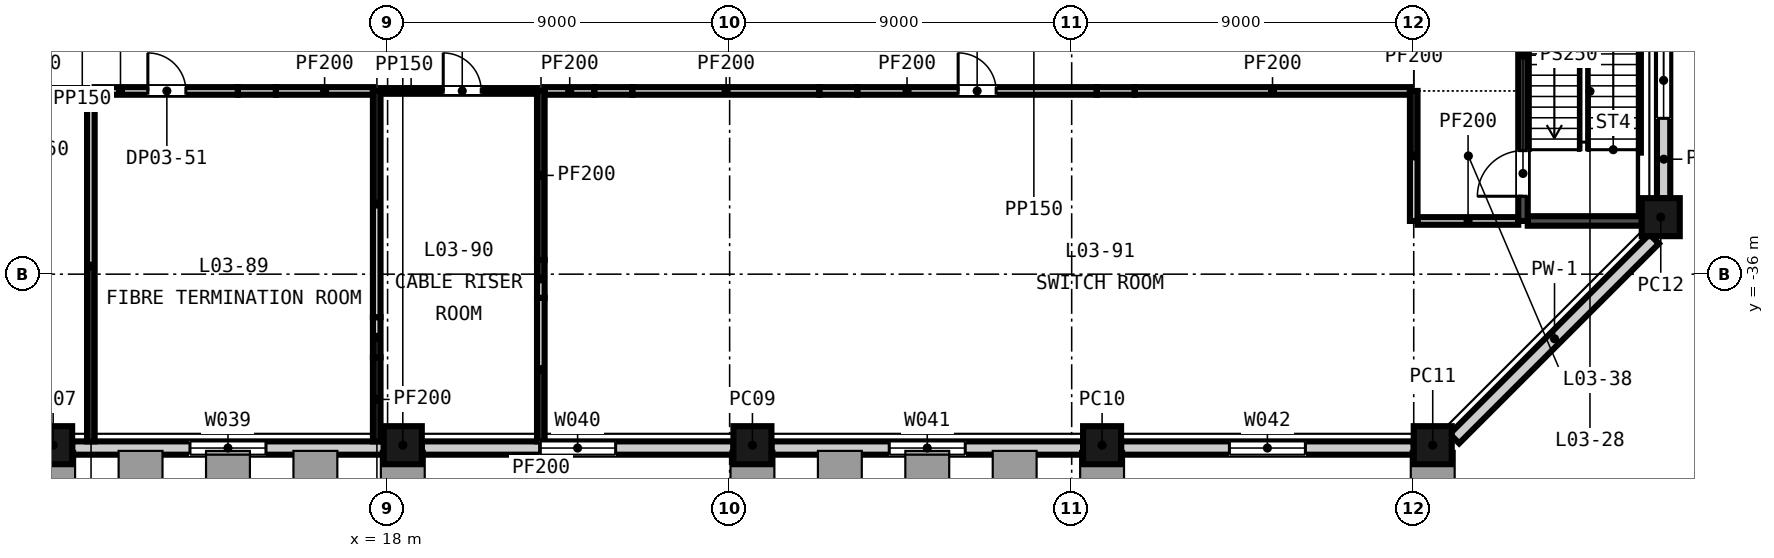
"""IFC4 building model, lengths in metres.
Left out: names, types, materials, properties, quantities, classifications, styles, units other than length and angle.
Written with IfcOpenShell. Run it as: python <this file> out.ifc"""

import sys

from ifc_helpers import new_model, si_unit, direction, frame, frame_2d, origin, origin_2d, place, context, subcontext, project, spatial, rectangle, extrude, element, fill, save


model = new_model("IFC4")
c1 = context("Model", 3, precision=1e-05, world=origin(), true_north=direction((0.0, 1.0)))
c2 = subcontext(c1, "Body", "Model", "MODEL_VIEW")
j1 = project(units=[si_unit("LENGTHUNIT", "METRE"), si_unit("PLANEANGLEUNIT", "RADIAN")], contexts=[c1])
p1 = place(None, origin())
s1 = spatial("IfcSite", under=j1, at=p1, CompositionType="ELEMENT")
p2 = place(p1, origin())
s2 = spatial("IfcBuilding", under=s1, at=p2, CompositionType="ELEMENT")
p3 = place(p2, frame((0.0, 0.0, 22.5)))
s3 = spatial("IfcBuildingStorey", under=s2, at=p3, CompositionType="ELEMENT", Elevation=22.5)
for number, where, z_axis, x_axis in (
    (1, (9.2, -40.5, -0.3), (0.0, 0.0, 1.0), (1.0, 0.0, 0.0)),
    (2, (18.4, -40.5, -0.3), (0.0, 0.0, 1.0), (1.0, 0.0, 0.0)),
    (3, (27.6, -40.5, -0.3), (0.0, 0.0, 1.0), (1.0, 0.0, 0.0)),
    (4, (36.8, -40.5, -0.3), (0.0, 0.0, 1.0), (1.0, 0.0, 0.0)),
    (5, (45.5, -40.5, -0.3), (0.0, 0.0, 1.0), (1.0, 0.0, 0.0)),
    (6, (51.5, -34.5, -0.3), (0.0, 0.0, 1.0), (0.0, 1.0, 0.0)),
):
    element("IfcColumn", number, at=place(p3, frame(where, z_axis=z_axis, x_axis=x_axis)), inside=s3, PredefinedType="COLUMN", context=c2, shape_type="SweptSolid", body=[
        extrude(rectangle(XDim=1.0, YDim=1.0, at=origin_2d()), origin(), (0.0, 0.0, 1.0), 4.5),
    ])
p4 = place(p3, frame((9.7, -40.575, -0.3), z_axis=(0.0, 0.0, 1.0), x_axis=(1.0, 0.0, 0.0)))
e7 = element("IfcWall", 7, at=p4, inside=s3, PredefinedType="SOLIDWALL", context=c2, shape_type="SweptSolid", body=[
    extrude(rectangle(XDim=8.2, YDim=0.35, at=frame_2d((4.1, 0.0))), origin(), (0.0, 0.0, 1.0), 3.6),
])
p5 = place(p4, frame((3.1, 0.0, 1.2)))
e8 = element("IfcOpeningElement", 8, at=p5, cuts=e7, PredefinedType="OPENING", context=c2, shape_type="SweptSolid", body=[
    extrude(rectangle(XDim=2.0, YDim=2.35, at=frame_2d((1.0, 1.175))), frame((0.0, 0.185, 0.0), z_axis=(0.0, -1.0, 0.0), x_axis=(1.0, 0.0, 0.0)), (0.0, 0.0, 1.0), 0.37),
])
p6 = place(p3, frame((18.9, -40.575, -0.3), z_axis=(0.0, 0.0, 1.0), x_axis=(1.0, 0.0, 0.0)))
e9 = element("IfcWall", 9, at=p6, inside=s3, PredefinedType="SOLIDWALL", context=c2, shape_type="SweptSolid", body=[
    extrude(rectangle(XDim=8.2, YDim=0.35, at=frame_2d((4.1, 0.0))), origin(), (0.0, 0.0, 1.0), 3.6),
])
p7 = place(p6, frame((3.1, 0.0, 1.2)))
e10 = element("IfcOpeningElement", 10, at=p7, cuts=e9, PredefinedType="OPENING", context=c2, shape_type="SweptSolid", body=[
    extrude(rectangle(XDim=2.0, YDim=2.35, at=frame_2d((1.0, 1.175))), frame((0.0, 0.185, 0.0), z_axis=(0.0, -1.0, 0.0), x_axis=(1.0, 0.0, 0.0)), (0.0, 0.0, 1.0), 0.37),
])
p8 = place(p3, frame((28.1, -40.575, -0.3), z_axis=(0.0, 0.0, 1.0), x_axis=(1.0, 0.0, 0.0)))
e11 = element("IfcWall", 11, at=p8, inside=s3, PredefinedType="SOLIDWALL", context=c2, shape_type="SweptSolid", body=[
    extrude(rectangle(XDim=8.2, YDim=0.35, at=frame_2d((4.1, 0.0))), origin(), (0.0, 0.0, 1.0), 3.6),
])
p9 = place(p8, frame((3.1, 0.0, 1.2)))
e12 = element("IfcOpeningElement", 12, at=p9, cuts=e11, PredefinedType="OPENING", context=c2, shape_type="SweptSolid", body=[
    extrude(rectangle(XDim=2.0, YDim=2.35, at=frame_2d((1.0, 1.175))), frame((0.0, 0.185, 0.0), z_axis=(0.0, -1.0, 0.0), x_axis=(1.0, 0.0, 0.0)), (0.0, 0.0, 1.0), 0.37),
])
p10 = place(p3, frame((37.3, -40.575, -0.3), z_axis=(0.0, 0.0, 1.0), x_axis=(1.0, 0.0, 0.0)))
e13 = element("IfcWall", 13, at=p10, inside=s3, PredefinedType="SOLIDWALL", context=c2, shape_type="SweptSolid", body=[
    extrude(rectangle(XDim=7.7, YDim=0.35, at=frame_2d((3.85, 0.0))), origin(), (0.0, 0.0, 1.0), 3.6),
])
p11 = place(p10, frame((2.85, 0.0, 1.2)))
e14 = element("IfcOpeningElement", 14, at=p11, cuts=e13, PredefinedType="OPENING", context=c2, shape_type="SweptSolid", body=[
    extrude(rectangle(XDim=2.0, YDim=2.35, at=frame_2d((1.0, 1.175))), frame((0.0, 0.185, 0.0), z_axis=(0.0, -1.0, 0.0), x_axis=(1.0, 0.0, 0.0)), (0.0, 0.0, 1.0), 0.37),
])
p12 = place(p3, frame((46.072, -40.327, -0.3), z_axis=(0.0, 0.0, 1.0), x_axis=(0.707106781187, 0.707106781187, 0.0)))
e15 = element("IfcWall", 15, at=p12, inside=s3, PredefinedType="SOLIDWALL", context=c2, shape_type="SweptSolid", body=[
    extrude(rectangle(XDim=7.433, YDim=0.35, at=frame_2d((3.716, 0.0))), origin(), (0.0, 0.0, 1.0), 3.6),
])
p13 = place(p3, frame((51.575, -34.0, -0.3), z_axis=(0.0, 0.0, 1.0), x_axis=(0.0, 1.0, 0.0)))
e16 = element("IfcWall", 16, at=p13, inside=s3, PredefinedType="SOLIDWALL", context=c2, shape_type="SweptSolid", body=[
    extrude(rectangle(XDim=6.2, YDim=0.35, at=frame_2d((3.1, 0.0))), origin(), (0.0, 0.0, 1.0), 3.6),
])
p14 = place(p13, frame((2.1, 0.0, 1.2)))
e17 = element("IfcOpeningElement", 17, at=p14, cuts=e16, PredefinedType="OPENING", context=c2, shape_type="SweptSolid", body=[
    extrude(rectangle(XDim=2.0, YDim=2.35, at=frame_2d((1.0, 1.175))), frame((0.0, 0.185, 0.0), z_axis=(0.0, -1.0, 0.0), x_axis=(1.0, 0.0, 0.0)), (0.0, 0.0, 1.0), 0.37),
])
p15 = place(p3, frame((45.1, -34.6, 0.0), z_axis=(0.0, 0.0, 1.0), x_axis=(1.0, 0.0, 0.0)))
e18 = element("IfcWall", 18, at=p15, inside=s3, PredefinedType="PARTITIONING", context=c2, shape_type="SweptSolid", body=[
    extrude(rectangle(XDim=2.65, YDim=0.2, at=frame_2d((1.325, 0.0))), origin(), (0.0, 0.0, 1.0), 4.2),
])
p16 = place(p3, frame((48.0, -34.6, 0.0), z_axis=(0.0, 0.0, 1.0), x_axis=(1.0, 0.0, 0.0)))
e19 = element("IfcWall", 19, at=p16, inside=s3, PredefinedType="SHEAR", context=c2, shape_type="SweptSolid", body=[
    extrude(rectangle(XDim=3.0, YDim=0.25, at=frame_2d((1.5, 0.0))), origin(), (0.0, 0.0, 1.0), 4.2),
])
p17 = place(p3, frame((4.223, -31.179, 0.0), z_axis=(0.0, 0.0, 1.0), x_axis=(1.0, 0.0, 0.0)))
e20 = element("IfcWall", 20, at=p17, inside=s3, PredefinedType="PARTITIONING", context=c2, shape_type="SweptSolid", body=[
    extrude(rectangle(XDim=5.869, YDim=0.15, at=frame_2d((2.935, 0.0))), origin(), (0.0, 0.0, 1.0), 4.2),
])
p18 = place(p17, frame((1.9, 0.0, 0.0)))
e21 = element("IfcOpeningElement", 21, at=p18, cuts=e20, PredefinedType="OPENING", context=c2, shape_type="SweptSolid", body=[
    extrude(rectangle(XDim=1.0, YDim=2.1, at=frame_2d((0.5, 1.05))), frame((0.0, 0.085, 0.0), z_axis=(0.0, -1.0, 0.0), x_axis=(1.0, 0.0, 0.0)), (0.0, 0.0, 1.0), 0.17),
])
p19 = place(p3, frame((10.292, -31.179, 0.0), z_axis=(0.0, 0.0, 1.0), x_axis=(1.0, 0.0, 0.0)))
e22 = element("IfcWall", 22, at=p19, inside=s3, PredefinedType="PARTITIONING", context=c2, shape_type="SweptSolid", body=[
    extrude(rectangle(XDim=3.77, YDim=0.2, at=frame_2d((1.885, 0.0))), origin(), (0.0, 0.0, 1.0), 4.2),
])
p20 = place(p19, frame((1.4, 0.0, 0.0)))
e23 = element("IfcOpeningElement", 23, at=p20, cuts=e22, PredefinedType="OPENING", context=c2, shape_type="SweptSolid", body=[
    extrude(rectangle(XDim=1.0, YDim=2.1, at=frame_2d((0.5, 1.05))), frame((0.0, 0.11, 0.0), z_axis=(0.0, -1.0, 0.0), x_axis=(1.0, 0.0, 0.0)), (0.0, 0.0, 1.0), 0.22),
])
p21 = place(p3, frame((14.062, -31.179, 0.0), z_axis=(0.0, 0.0, 1.0), x_axis=(1.0, 0.0, 0.0)))
e24 = element("IfcWall", 24, at=p21, inside=s3, PredefinedType="PARTITIONING", context=c2, shape_type="SweptSolid", body=[
    extrude(rectangle(XDim=1.0, YDim=0.2, at=frame_2d((0.5, 0.0))), origin(), (0.0, 0.0, 1.0), 3.451),
])
p22 = place(p3, frame((15.062, -31.179, 0.0), z_axis=(0.0, 0.0, 1.0), x_axis=(1.0, 0.0, 0.0)))
e25 = element("IfcWall", 25, at=p22, inside=s3, PredefinedType="PARTITIONING", context=c2, shape_type="SweptSolid", body=[
    extrude(rectangle(XDim=2.552, YDim=0.2, at=frame_2d((1.276, 0.0))), origin(), (0.0, 0.0, 1.0), 4.2),
])
p23 = place(p3, frame((17.814, -31.179, 0.0), z_axis=(0.0, 0.0, 1.0), x_axis=(1.0, 0.0, 0.0)))
e26 = element("IfcWall", 26, at=p23, inside=s3, PredefinedType="PARTITIONING", context=c2, shape_type="SweptSolid", body=[
    extrude(rectangle(XDim=4.118, YDim=0.15, at=frame_2d((2.059, 0.0))), origin(), (0.0, 0.0, 1.0), 4.2),
])
p24 = place(p23, frame((1.65, 0.0, 0.0)))
e27 = element("IfcOpeningElement", 27, at=p24, cuts=e26, PredefinedType="OPENING", context=c2, shape_type="SweptSolid", body=[
    extrude(rectangle(XDim=1.0, YDim=2.1, at=frame_2d((0.5, 1.05))), frame((0.0, 0.085, 0.0), z_axis=(0.0, -1.0, 0.0), x_axis=(1.0, 0.0, 0.0)), (0.0, 0.0, 1.0), 0.17),
])
p25 = place(p3, frame((22.132, -31.179, 0.0), z_axis=(0.0, 0.0, 1.0), x_axis=(1.0, 0.0, 0.0)))
e28 = element("IfcWall", 28, at=p25, inside=s3, PredefinedType="PARTITIONING", context=c2, shape_type="SweptSolid", body=[
    extrude(rectangle(XDim=1.31, YDim=0.2, at=frame_2d((0.655, 0.0))), origin(), (0.0, 0.0, 1.0), 4.2),
])
p26 = place(p3, frame((23.442, -31.179, 0.0), z_axis=(0.0, 0.0, 1.0), x_axis=(1.0, 0.0, 0.0)))
e29 = element("IfcWall", 29, at=p26, inside=s3, PredefinedType="PARTITIONING", context=c2, shape_type="SweptSolid", body=[
    extrude(rectangle(XDim=1.0, YDim=0.2, at=frame_2d((0.5, 0.0))), origin(), (0.0, 0.0, 1.0), 3.298),
])
p27 = place(p3, frame((24.442, -31.179, 0.0), z_axis=(0.0, 0.0, 1.0), x_axis=(1.0, 0.0, 0.0)))
e30 = element("IfcWall", 30, at=p27, inside=s3, PredefinedType="PARTITIONING", context=c2, shape_type="SweptSolid", body=[
    extrude(rectangle(XDim=4.921, YDim=0.2, at=frame_2d((2.46, 0.0))), origin(), (0.0, 0.0, 1.0), 4.2),
])
p28 = place(p3, frame((29.363, -31.179, 0.0), z_axis=(0.0, 0.0, 1.0), x_axis=(1.0, 0.0, 0.0)))
e31 = element("IfcWall", 31, at=p28, inside=s3, PredefinedType="PARTITIONING", context=c2, shape_type="SweptSolid", body=[
    extrude(rectangle(XDim=1.0, YDim=0.2, at=frame_2d((0.5, 0.0))), origin(), (0.0, 0.0, 1.0), 3.219),
])
p29 = place(p3, frame((30.363, -31.179, 0.0), z_axis=(0.0, 0.0, 1.0), x_axis=(1.0, 0.0, 0.0)))
e32 = element("IfcWall", 32, at=p29, inside=s3, PredefinedType="PARTITIONING", context=c2, shape_type="SweptSolid", body=[
    extrude(rectangle(XDim=6.297, YDim=0.2, at=frame_2d((3.148, 0.0))), origin(), (0.0, 0.0, 1.0), 4.2),
])
p30 = place(p29, frame((2.65, 0.0, 0.0)))
e33 = element("IfcOpeningElement", 33, at=p30, cuts=e32, PredefinedType="OPENING", context=c2, shape_type="SweptSolid", body=[
    extrude(rectangle(XDim=1.0, YDim=2.1, at=frame_2d((0.5, 1.05))), frame((0.0, 0.11, 0.0), z_axis=(0.0, -1.0, 0.0), x_axis=(1.0, 0.0, 0.0)), (0.0, 0.0, 1.0), 0.22),
])
p31 = place(p3, frame((36.659, -31.179, 0.0), z_axis=(0.0, 0.0, 1.0), x_axis=(1.0, 0.0, 0.0)))
e34 = element("IfcWall", 34, at=p31, inside=s3, PredefinedType="PARTITIONING", context=c2, shape_type="SweptSolid", body=[
    extrude(rectangle(XDim=1.0, YDim=0.2, at=frame_2d((0.5, 0.0))), origin(), (0.0, 0.0, 1.0), 3.111),
])
p32 = place(p3, frame((37.659, -31.179, 0.0), z_axis=(0.0, 0.0, 1.0), x_axis=(1.0, 0.0, 0.0)))
e35 = element("IfcWall", 35, at=p32, inside=s3, PredefinedType="PARTITIONING", context=c2, shape_type="SweptSolid", body=[
    extrude(rectangle(XDim=7.241, YDim=0.2, at=frame_2d((3.62, 0.0))), origin(), (0.0, 0.0, 1.0), 4.2),
])
p33 = place(p3, frame((10.192, -40.4, 0.0), z_axis=(0.0, 0.0, 1.0), x_axis=(0.0, 1.0, 0.0)))
e36 = element("IfcWall", 36, at=p33, inside=s3, PredefinedType="PARTITIONING", context=c2, shape_type="SweptSolid", body=[
    extrude(rectangle(XDim=9.221, YDim=0.2, at=frame_2d((4.61, 0.0))), origin(), (0.0, 0.0, 1.0), 4.2),
])
p34 = place(p3, frame((17.714, -40.4, 0.0), z_axis=(0.0, 0.0, 1.0), x_axis=(0.0, 1.0, 0.0)))
e37 = element("IfcWall", 37, at=p34, inside=s3, PredefinedType="PARTITIONING", context=c2, shape_type="SweptSolid", body=[
    extrude(rectangle(XDim=2.208, YDim=0.2, at=frame_2d((1.104, 0.0))), origin(), (0.0, 0.0, 1.0), 4.2),
])
p35 = place(p3, frame((17.714, -38.191, 0.0), z_axis=(0.0, 0.0, 1.0), x_axis=(0.0, 1.0, 0.0)))
e38 = element("IfcWall", 38, at=p35, inside=s3, PredefinedType="PARTITIONING", context=c2, shape_type="SweptSolid", body=[
    extrude(rectangle(XDim=1.06, YDim=0.2, at=frame_2d((0.53, 0.0))), origin(), (0.0, 0.0, 1.0), 3.451),
])
p36 = place(p3, frame((17.714, -37.132, 0.0), z_axis=(0.0, 0.0, 1.0), x_axis=(0.0, 1.0, 0.0)))
e39 = element("IfcWall", 39, at=p36, inside=s3, PredefinedType="PARTITIONING", context=c2, shape_type="SweptSolid", body=[
    extrude(rectangle(XDim=5.953, YDim=0.2, at=frame_2d((2.976, 0.0))), origin(), (0.0, 0.0, 1.0), 4.2),
])
p37 = place(p3, frame((22.032, -40.4, 0.0), z_axis=(0.0, 0.0, 1.0), x_axis=(0.0, 1.0, 0.0)))
e40 = element("IfcWall", 40, at=p37, inside=s3, PredefinedType="PARTITIONING", context=c2, shape_type="SweptSolid", body=[
    extrude(rectangle(XDim=3.776, YDim=0.2, at=frame_2d((1.888, 0.0))), origin(), (0.0, 0.0, 1.0), 4.2),
])
p38 = place(p3, frame((22.032, -36.624, 0.0), z_axis=(0.0, 0.0, 1.0), x_axis=(0.0, 1.0, 0.0)))
e41 = element("IfcWall", 41, at=p38, inside=s3, PredefinedType="PARTITIONING", context=c2, shape_type="SweptSolid", body=[
    extrude(rectangle(XDim=1.0, YDim=0.2, at=frame_2d((0.5, 0.0))), origin(), (0.0, 0.0, 1.0), 3.451),
])
p39 = place(p3, frame((22.032, -35.624, 0.0), z_axis=(0.0, 0.0, 1.0), x_axis=(0.0, 1.0, 0.0)))
e42 = element("IfcWall", 42, at=p39, inside=s3, PredefinedType="PARTITIONING", context=c2, shape_type="SweptSolid", body=[
    extrude(rectangle(XDim=4.445, YDim=0.2, at=frame_2d((2.222, 0.0))), origin(), (0.0, 0.0, 1.0), 4.2),
])
p40 = place(p3, frame((45.0, -34.6, 0.0), z_axis=(0.0, 0.0, 1.0), x_axis=(0.0, 1.0, 0.0)))
e43 = element("IfcWall", 43, at=p40, inside=s3, PredefinedType="PARTITIONING", context=c2, shape_type="SweptSolid", body=[
    extrude(rectangle(XDim=3.421, YDim=0.2, at=frame_2d((1.71, 0.0))), origin(), (0.0, 0.0, 1.0), 4.2),
])
p41 = place(p3, frame((47.875, -34.6, 0.0), z_axis=(0.0, 0.0, 1.0), x_axis=(0.0, 1.0, 0.0)))
e44 = element("IfcWall", 44, at=p41, inside=s3, PredefinedType="SHEAR", context=c2, shape_type="SweptSolid", body=[
    extrude(rectangle(XDim=6.821, YDim=0.25, at=frame_2d((3.411, 0.0))), origin(), (0.0, 0.0, 1.0), 4.2),
])
p42 = place(p41, frame((0.65, 0.0, 0.0)))
e45 = element("IfcOpeningElement", 45, at=p42, cuts=e44, PredefinedType="OPENING", context=c2, shape_type="SweptSolid", body=[
    extrude(rectangle(XDim=1.2, YDim=2.1, at=frame_2d((0.6, 1.05))), frame((0.0, 0.135, 0.0), z_axis=(0.0, -1.0, 0.0), x_axis=(1.0, 0.0, 0.0)), (0.0, 0.0, 1.0), 0.27),
])
p43 = place(p5, origin())
e46 = element("IfcWindow", 46, at=p43, inside=s3, PartitioningType="SINGLE_PANEL", PredefinedType="WINDOW", context=c2, shape_type="SweptSolid", body=[
    extrude(rectangle(XDim=2.0, YDim=2.35, at=frame_2d((1.0, 1.175))), frame((0.0, 0.03, 0.0), z_axis=(0.0, -1.0, 0.0), x_axis=(1.0, 0.0, 0.0)), (0.0, 0.0, 1.0), 0.06),
])
fill(e8, e46)
p44 = place(p7, origin())
e47 = element("IfcWindow", 47, at=p44, inside=s3, PartitioningType="SINGLE_PANEL", PredefinedType="WINDOW", context=c2, shape_type="SweptSolid", body=[
    extrude(rectangle(XDim=2.0, YDim=2.35, at=frame_2d((1.0, 1.175))), frame((0.0, 0.03, 0.0), z_axis=(0.0, -1.0, 0.0), x_axis=(1.0, 0.0, 0.0)), (0.0, 0.0, 1.0), 0.06),
])
fill(e10, e47)
p45 = place(p9, origin())
e48 = element("IfcWindow", 48, at=p45, inside=s3, PartitioningType="SINGLE_PANEL", PredefinedType="WINDOW", context=c2, shape_type="SweptSolid", body=[
    extrude(rectangle(XDim=2.0, YDim=2.35, at=frame_2d((1.0, 1.175))), frame((0.0, 0.03, 0.0), z_axis=(0.0, -1.0, 0.0), x_axis=(1.0, 0.0, 0.0)), (0.0, 0.0, 1.0), 0.06),
])
fill(e12, e48)
p46 = place(p11, origin())
e49 = element("IfcWindow", 49, at=p46, inside=s3, PartitioningType="SINGLE_PANEL", PredefinedType="WINDOW", context=c2, shape_type="SweptSolid", body=[
    extrude(rectangle(XDim=2.0, YDim=2.35, at=frame_2d((1.0, 1.175))), frame((0.0, 0.03, 0.0), z_axis=(0.0, -1.0, 0.0), x_axis=(1.0, 0.0, 0.0)), (0.0, 0.0, 1.0), 0.06),
])
fill(e14, e49)
p47 = place(p14, origin())
e50 = element("IfcWindow", 50, at=p47, inside=s3, PartitioningType="SINGLE_PANEL", PredefinedType="WINDOW", context=c2, shape_type="SweptSolid", body=[
    extrude(rectangle(XDim=2.0, YDim=2.35, at=frame_2d((1.0, 1.175))), frame((0.0, 0.03, 0.0), z_axis=(0.0, -1.0, 0.0), x_axis=(1.0, 0.0, 0.0)), (0.0, 0.0, 1.0), 0.06),
])
fill(e17, e50)
p48 = place(p42, origin())
e51 = element("IfcDoor", 51, at=p48, inside=s3, OperationType="SINGLE_SWING_LEFT", PredefinedType="DOOR", context=c2, shape_type="SweptSolid", body=[
    extrude(rectangle(XDim=1.2, YDim=2.1, at=frame_2d((0.6, 1.05))), frame((0.0, 0.025, 0.0), z_axis=(0.0, -1.0, 0.0), x_axis=(1.0, 0.0, 0.0)), (0.0, 0.0, 1.0), 0.05),
])
fill(e45, e51)
p49 = place(p20, origin())
e52 = element("IfcDoor", 52, at=p49, inside=s3, OperationType="SINGLE_SWING_LEFT", PredefinedType="DOOR", context=c2, shape_type="SweptSolid", body=[
    extrude(rectangle(XDim=1.0, YDim=2.1, at=frame_2d((0.5, 1.05))), frame((0.0, 0.025, 0.0), z_axis=(0.0, -1.0, 0.0), x_axis=(1.0, 0.0, 0.0)), (0.0, 0.0, 1.0), 0.05),
])
fill(e23, e52)
p50 = place(p24, origin())
e53 = element("IfcDoor", 53, at=p50, inside=s3, OperationType="SINGLE_SWING_LEFT", PredefinedType="DOOR", context=c2, shape_type="SweptSolid", body=[
    extrude(rectangle(XDim=1.0, YDim=2.1, at=frame_2d((0.5, 1.05))), frame((0.0, 0.025, 0.0), z_axis=(0.0, -1.0, 0.0), x_axis=(1.0, 0.0, 0.0)), (0.0, 0.0, 1.0), 0.05),
])
fill(e27, e53)
p51 = place(p30, origin())
e54 = element("IfcDoor", 54, at=p51, inside=s3, OperationType="SINGLE_SWING_LEFT", PredefinedType="DOOR", context=c2, shape_type="SweptSolid", body=[
    extrude(rectangle(XDim=1.0, YDim=2.1, at=frame_2d((0.5, 1.05))), frame((0.0, 0.025, 0.0), z_axis=(0.0, -1.0, 0.0), x_axis=(1.0, 0.0, 0.0)), (0.0, 0.0, 1.0), 0.05),
])
fill(e33, e54)
save(model, sys.argv[1])
